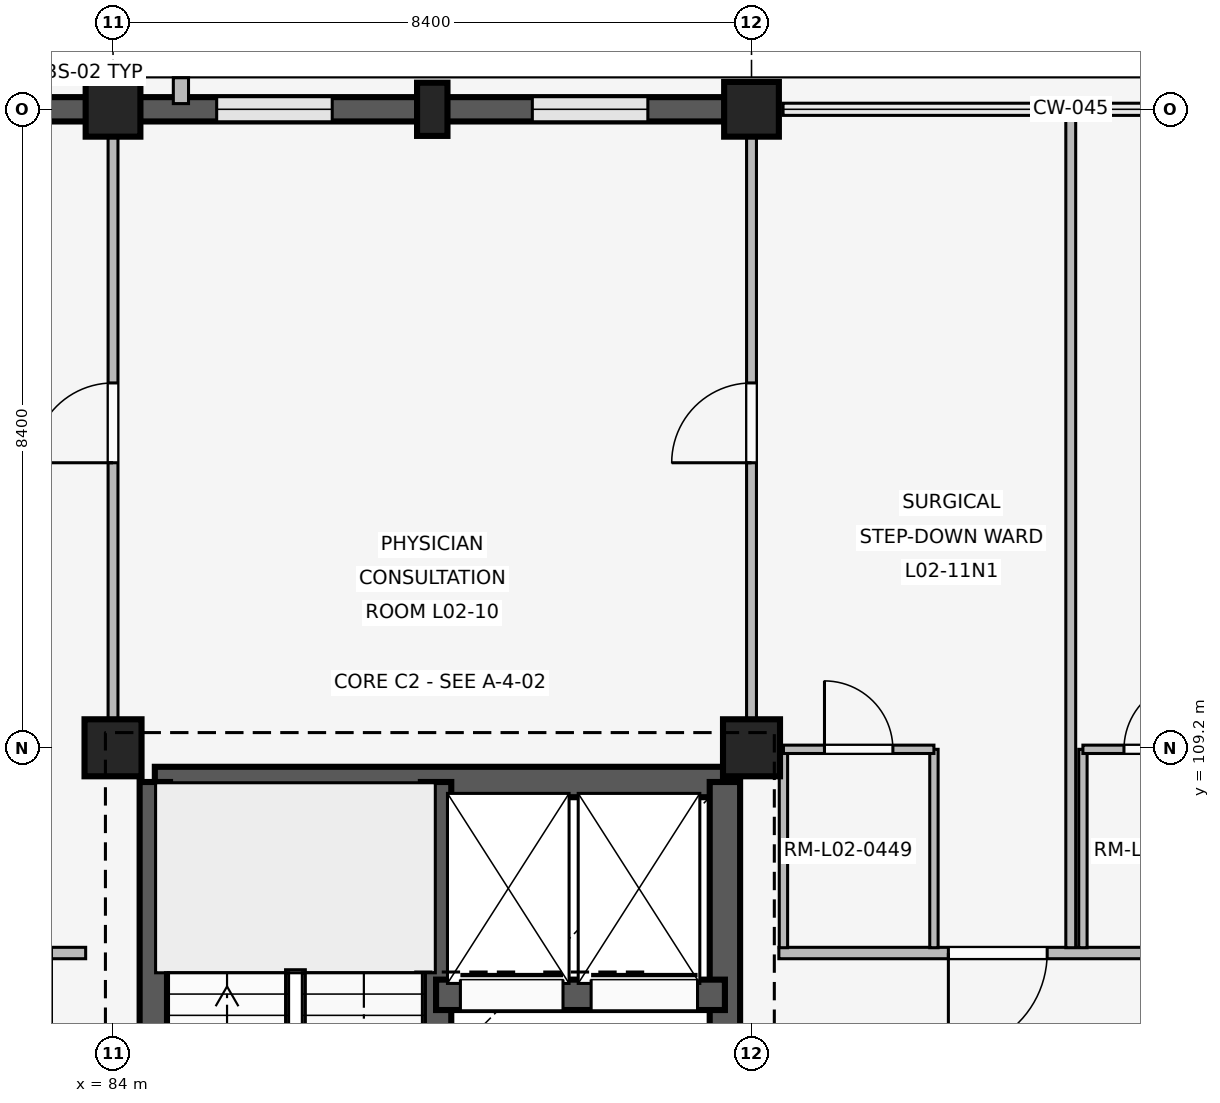
"""IFC4 building model, lengths in metres.
Left out: names, types, materials, properties, quantities, classifications, styles, units other than length and angle.
Written with IfcOpenShell. Run it as: python <this file> out.ifc"""

import sys

from ifc_helpers import new_model, si_unit, direction, frame, frame_2d, origin, origin_2d, place, context, subcontext, project, spatial, rectangle, extrude, element, fill, save


model = new_model("IFC4")
c1 = context("Model", 3, precision=1e-05, world=origin(), true_north=direction((0.0, 1.0)))
c2 = subcontext(c1, "Body", "Model", "MODEL_VIEW")
j1 = project(units=[si_unit("LENGTHUNIT", "METRE"), si_unit("PLANEANGLEUNIT", "RADIAN")], contexts=[c1])
p1 = place(None, origin())
s1 = spatial("IfcSite", under=j1, at=p1, CompositionType="ELEMENT")
p2 = place(p1, origin())
s2 = spatial("IfcBuilding", under=s1, at=p2, CompositionType="ELEMENT")
p3 = place(p2, frame((0.0, 0.0, 8.1)))
s3 = spatial("IfcBuildingStorey", under=s2, at=p3, CompositionType="ELEMENT", Elevation=8.1)
p4 = place(p3, frame((84.0, 109.2, 0.0), z_axis=(0.0, 0.0, 1.0), x_axis=(1.0, 0.0, 0.0)))
e1 = element("IfcColumn", 1, at=p4, inside=s3, PredefinedType="COLUMN", context=c2, shape_type="SweptSolid", body=[
    extrude(rectangle(XDim=0.75, YDim=0.75, at=origin_2d()), origin(), (0.0, 0.0, 1.0), 4.8),
])
p5 = place(p3, frame((84.0, 117.6, 0.0), z_axis=(0.0, 0.0, 1.0), x_axis=(1.0, 0.0, 0.0)))
e2 = element("IfcColumn", 2, at=p5, inside=s3, PredefinedType="COLUMN", context=c2, shape_type="SweptSolid", body=[
    extrude(rectangle(XDim=0.72, YDim=0.72, at=origin_2d()), origin(), (0.0, 0.0, 1.0), 4.8),
])
p6 = place(p3, frame((92.4, 109.2, 0.0), z_axis=(0.0, 0.0, 1.0), x_axis=(1.0, 0.0, 0.0)))
e3 = element("IfcColumn", 3, at=p6, inside=s3, PredefinedType="COLUMN", context=c2, shape_type="SweptSolid", body=[
    extrude(rectangle(XDim=0.75, YDim=0.75, at=origin_2d()), origin(), (0.0, 0.0, 1.0), 4.8),
])
p7 = place(p3, frame((92.4, 117.6, 0.0), z_axis=(0.0, 0.0, 1.0), x_axis=(1.0, 0.0, 0.0)))
e4 = element("IfcColumn", 4, at=p7, inside=s3, PredefinedType="COLUMN", context=c2, shape_type="SweptSolid", body=[
    extrude(rectangle(XDim=0.72, YDim=0.72, at=origin_2d()), origin(), (0.0, 0.0, 1.0), 4.8),
])
p8 = place(p3, frame((88.2, 117.6, 0.0), z_axis=(0.0, 0.0, 1.0), x_axis=(1.0, 0.0, 0.0)))
e5 = element("IfcColumn", 5, at=p8, inside=s3, PredefinedType="PILASTER", context=c2, shape_type="SweptSolid", body=[
    extrude(rectangle(XDim=0.4, YDim=0.7, at=origin_2d()), origin(), (0.0, 0.0, 1.0), 4.8),
])
p9 = place(p3, frame((75.955, 117.6, 0.0), z_axis=(0.0, 0.0, 1.0), x_axis=(1.0, 0.0, 0.0)))
e6 = element("IfcWall", 6, at=p9, inside=s3, PredefinedType="SOLIDWALL", context=c2, shape_type="SweptSolid", body=[
    extrude(rectangle(XDim=7.69, YDim=0.32, at=frame_2d((3.845, 0.0))), origin(), (0.0, 0.0, 1.0), 3.86),
])
p10 = place(p9, frame((0.969, 0.0, 0.85)))
e7 = element("IfcOpeningElement", 7, at=p10, cuts=e6, PredefinedType="OPENING", context=c2, shape_type="SweptSolid", body=[
    extrude(rectangle(XDim=1.6, YDim=1.65, at=frame_2d((0.8, 0.825))), frame((0.0, 0.17, 0.0), z_axis=(0.0, -1.0, 0.0), x_axis=(1.0, 0.0, 0.0)), (0.0, 0.0, 1.0), 0.34),
])
p11 = place(p9, frame((5.121, 0.0, 0.85)))
e8 = element("IfcOpeningElement", 8, at=p11, cuts=e6, PredefinedType="OPENING", context=c2, shape_type="SweptSolid", body=[
    extrude(rectangle(XDim=1.6, YDim=1.65, at=frame_2d((0.8, 0.825))), frame((0.0, 0.17, 0.0), z_axis=(0.0, -1.0, 0.0), x_axis=(1.0, 0.0, 0.0)), (0.0, 0.0, 1.0), 0.34),
])
p12 = place(p3, frame((84.355, 117.6, 0.0), z_axis=(0.0, 0.0, 1.0), x_axis=(1.0, 0.0, 0.0)))
e9 = element("IfcWall", 9, at=p12, inside=s3, PredefinedType="SOLIDWALL", context=c2, shape_type="SweptSolid", body=[
    extrude(rectangle(XDim=7.69, YDim=0.32, at=frame_2d((3.845, 0.0))), origin(), (0.0, 0.0, 1.0), 3.86),
])
p13 = place(p12, frame((1.009, 0.0, 0.85)))
e10 = element("IfcOpeningElement", 10, at=p13, cuts=e9, PredefinedType="OPENING", context=c2, shape_type="SweptSolid", body=[
    extrude(rectangle(XDim=1.52, YDim=1.65, at=frame_2d((0.76, 0.825))), frame((0.0, 0.17, 0.0), z_axis=(0.0, -1.0, 0.0), x_axis=(1.0, 0.0, 0.0)), (0.0, 0.0, 1.0), 0.34),
])
p14 = place(p12, frame((5.161, 0.0, 0.85)))
e11 = element("IfcOpeningElement", 11, at=p14, cuts=e9, PredefinedType="OPENING", context=c2, shape_type="SweptSolid", body=[
    extrude(rectangle(XDim=1.52, YDim=1.65, at=frame_2d((0.76, 0.825))), frame((0.0, 0.17, 0.0), z_axis=(0.0, -1.0, 0.0), x_axis=(1.0, 0.0, 0.0)), (0.0, 0.0, 1.0), 0.34),
])
p15 = place(p3, frame((84.893, 117.675, 0.0), z_axis=(0.0, 0.0, 1.0), x_axis=(0.0, 1.0, 0.0)))
e12 = element("IfcWall", 12, at=p15, inside=s3, PredefinedType="ELEMENTEDWALL", context=c2, shape_type="SweptSolid", body=[
    extrude(rectangle(XDim=0.34, YDim=0.2, at=frame_2d((0.17, 0.0))), origin(), (0.0, 0.0, 1.0), 3.84),
])
p16 = place(p3, frame((84.55, 108.75, 0.0), z_axis=(0.0, 0.0, 1.0), x_axis=(1.0, 0.0, 0.0)))
e13 = element("IfcWall", 13, at=p16, inside=s3, PredefinedType="SHEAR", context=c2, shape_type="SweptSolid", body=[
    extrude(rectangle(XDim=7.5, YDim=0.4, at=frame_2d((3.75, 0.0))), origin(), (0.0, 0.0, 1.0), 4.52),
])
p17 = place(p3, frame((84.55, 101.2, 0.0), z_axis=(0.0, 0.0, 1.0), x_axis=(0.0, 1.0, 0.0)))
e14 = element("IfcWall", 14, at=p17, inside=s3, PredefinedType="SHEAR", context=c2, shape_type="SweptSolid", body=[
    extrude(rectangle(XDim=7.55, YDim=0.4, at=frame_2d((3.775, 0.0))), origin(), (0.0, 0.0, 1.0), 4.52),
])
p18 = place(p17, frame((0.28, 0.0, 0.0)))
e15 = element("IfcOpeningElement", 15, at=p18, cuts=e14, PredefinedType="OPENING", context=c2, shape_type="SweptSolid", body=[
    extrude(rectangle(XDim=1.0, YDim=2.15, at=frame_2d((0.5, 1.075))), frame((0.0, 0.21, 0.0), z_axis=(0.0, -1.0, 0.0), x_axis=(1.0, 0.0, 0.0)), (0.0, 0.0, 1.0), 0.42),
])
p19 = place(p3, frame((92.05, 101.2, 0.0), z_axis=(0.0, 0.0, 1.0), x_axis=(0.0, 1.0, 0.0)))
e16 = element("IfcWall", 16, at=p19, inside=s3, PredefinedType="SHEAR", context=c2, shape_type="SweptSolid", body=[
    extrude(rectangle(XDim=7.55, YDim=0.4, at=frame_2d((3.775, 0.0))), origin(), (0.0, 0.0, 1.0), 4.52),
])
p20 = place(p19, frame((2.4, 0.0, 0.0)))
e17 = element("IfcOpeningElement", 17, at=p20, cuts=e16, PredefinedType="OPENING", context=c2, shape_type="SweptSolid", body=[
    extrude(rectangle(XDim=1.2, YDim=2.2, at=frame_2d((0.6, 1.1))), frame((0.0, 0.21, 0.0), z_axis=(0.0, -1.0, 0.0), x_axis=(1.0, 0.0, 0.0)), (0.0, 0.0, 1.0), 0.42),
])
p21 = place(p3, frame((88.25, 101.2, 0.0), z_axis=(0.0, 0.0, 1.0), x_axis=(0.0, 1.0, 0.0)))
e18 = element("IfcWall", 18, at=p21, inside=s3, PredefinedType="SHEAR", context=c2, shape_type="SweptSolid", body=[
    extrude(rectangle(XDim=7.55, YDim=0.4, at=frame_2d((3.775, 0.0))), origin(), (0.0, 0.0, 1.0), 4.52),
])
p22 = place(p21, frame((0.28, 0.0, 0.0)))
e19 = element("IfcOpeningElement", 19, at=p22, cuts=e18, PredefinedType="OPENING", context=c2, shape_type="SweptSolid", body=[
    extrude(rectangle(XDim=1.0, YDim=2.15, at=frame_2d((0.5, 1.075))), frame((0.0, 0.21, 0.0), z_axis=(0.0, -1.0, 0.0), x_axis=(1.0, 0.0, 0.0)), (0.0, 0.0, 1.0), 0.42),
])
p23 = place(p3, frame((88.25, 105.95, 0.0), z_axis=(0.0, 0.0, 1.0), x_axis=(1.0, 0.0, 0.0)))
e20 = element("IfcWall", 20, at=p23, inside=s3, PredefinedType="SHEAR", context=c2, shape_type="SweptSolid", body=[
    extrude(rectangle(XDim=3.8, YDim=0.4, at=frame_2d((1.9, 0.0))), origin(), (0.0, 0.0, 1.0), 4.52),
])
p24 = place(p23, frame((0.32, 0.0, 0.0)))
e21 = element("IfcOpeningElement", 21, at=p24, cuts=e20, PredefinedType="OPENING", context=c2, shape_type="SweptSolid", body=[
    extrude(rectangle(XDim=1.35, YDim=2.25, at=frame_2d((0.675, 1.125))), frame((0.0, 0.21, 0.0), z_axis=(0.0, -1.0, 0.0), x_axis=(1.0, 0.0, 0.0)), (0.0, 0.0, 1.0), 0.42),
])
p25 = place(p23, frame((2.04, 0.0, 0.0)))
e22 = element("IfcOpeningElement", 22, at=p25, cuts=e20, PredefinedType="OPENING", context=c2, shape_type="SweptSolid", body=[
    extrude(rectangle(XDim=1.4, YDim=2.25, at=frame_2d((0.7, 1.125))), frame((0.0, 0.21, 0.0), z_axis=(0.0, -1.0, 0.0), x_axis=(1.0, 0.0, 0.0)), (0.0, 0.0, 1.0), 0.42),
])
p26 = place(p3, frame((83.64, 106.5, 0.0), z_axis=(0.0, 0.0, 1.0), x_axis=(-1.0, 0.0, 0.0)))
e23 = element("IfcWall", 23, at=p26, inside=s3, PredefinedType="PARTITIONING", context=c2, shape_type="SweptSolid", body=[
    extrude(rectangle(XDim=7.96, YDim=0.15, at=frame_2d((3.98, 0.0))), origin(), (0.0, 0.0, 1.0), 3.84),
])
p27 = place(p26, frame((0.45, 0.0, 0.0)))
e24 = element("IfcOpeningElement", 24, at=p27, cuts=e23, PredefinedType="OPENING", context=c2, shape_type="SweptSolid", body=[
    extrude(rectangle(XDim=1.3, YDim=2.25, at=frame_2d((0.65, 1.125))), frame((0.0, 0.085, 0.0), z_axis=(0.0, -1.0, 0.0), x_axis=(1.0, 0.0, 0.0)), (0.0, 0.0, 1.0), 0.17),
])
p28 = place(p26, frame((4.15, 0.0, 0.0)))
e25 = element("IfcOpeningElement", 25, at=p28, cuts=e23, PredefinedType="OPENING", context=c2, shape_type="SweptSolid", body=[
    extrude(rectangle(XDim=1.3, YDim=2.25, at=frame_2d((0.65, 1.125))), frame((0.0, 0.085, 0.0), z_axis=(0.0, -1.0, 0.0), x_axis=(1.0, 0.0, 0.0)), (0.0, 0.0, 1.0), 0.17),
])
p29 = place(p3, frame((84.0, 109.55, 0.0), z_axis=(0.0, 0.0, 1.0), x_axis=(0.0, 1.0, 0.0)))
e26 = element("IfcWall", 26, at=p29, inside=s3, PredefinedType="PARTITIONING", context=c2, shape_type="SweptSolid", body=[
    extrude(rectangle(XDim=7.91, YDim=0.13, at=frame_2d((3.955, 0.0))), origin(), (0.0, 0.0, 1.0), 3.84),
])
p30 = place(p29, frame((3.4, 0.0, 0.0)))
e27 = element("IfcOpeningElement", 27, at=p30, cuts=e26, PredefinedType="OPENING", context=c2, shape_type="SweptSolid", body=[
    extrude(rectangle(XDim=1.05, YDim=2.2, at=frame_2d((0.525, 1.1))), frame((0.0, 0.075, 0.0), z_axis=(0.0, -1.0, 0.0), x_axis=(1.0, 0.0, 0.0)), (0.0, 0.0, 1.0), 0.15),
])
p31 = place(p3, frame((92.4, 109.55, 0.0), z_axis=(0.0, 0.0, 1.0), x_axis=(0.0, 1.0, 0.0)))
e28 = element("IfcWall", 28, at=p31, inside=s3, PredefinedType="PARTITIONING", context=c2, shape_type="SweptSolid", body=[
    extrude(rectangle(XDim=7.91, YDim=0.13, at=frame_2d((3.955, 0.0))), origin(), (0.0, 0.0, 1.0), 3.84),
])
p32 = place(p31, frame((3.4, 0.0, 0.0)))
e29 = element("IfcOpeningElement", 29, at=p32, cuts=e28, PredefinedType="OPENING", context=c2, shape_type="SweptSolid", body=[
    extrude(rectangle(XDim=1.05, YDim=2.2, at=frame_2d((0.525, 1.1))), frame((0.0, 0.075, 0.0), z_axis=(0.0, -1.0, 0.0), x_axis=(1.0, 0.0, 0.0)), (0.0, 0.0, 1.0), 0.15),
])
p33 = place(p3, frame((100.72, 106.5, 0.0), z_axis=(0.0, 0.0, 1.0), x_axis=(-1.0, 0.0, 0.0)))
e30 = element("IfcWall", 30, at=p33, inside=s3, PredefinedType="PARTITIONING", context=c2, shape_type="SweptSolid", body=[
    extrude(rectangle(XDim=7.96, YDim=0.15, at=frame_2d((3.98, 0.0))), origin(), (0.0, 0.0, 1.0), 3.84),
])
p34 = place(p33, frame((0.73, 0.0, 0.0)))
e31 = element("IfcOpeningElement", 31, at=p34, cuts=e30, PredefinedType="OPENING", context=c2, shape_type="SweptSolid", body=[
    extrude(rectangle(XDim=1.3, YDim=2.25, at=frame_2d((0.65, 1.125))), frame((0.0, 0.085, 0.0), z_axis=(0.0, -1.0, 0.0), x_axis=(1.0, 0.0, 0.0)), (0.0, 0.0, 1.0), 0.17),
])
p35 = place(p33, frame((4.43, 0.0, 0.0)))
e32 = element("IfcOpeningElement", 32, at=p35, cuts=e30, PredefinedType="OPENING", context=c2, shape_type="SweptSolid", body=[
    extrude(rectangle(XDim=1.3, YDim=2.25, at=frame_2d((0.65, 1.125))), frame((0.0, 0.085, 0.0), z_axis=(0.0, -1.0, 0.0), x_axis=(1.0, 0.0, 0.0)), (0.0, 0.0, 1.0), 0.17),
])
p36 = place(p3, frame((96.6, 106.57, 0.0), z_axis=(0.0, 0.0, 1.0), x_axis=(0.0, 1.0, 0.0)))
e33 = element("IfcWall", 33, at=p36, inside=s3, PredefinedType="PARTITIONING", context=c2, shape_type="SweptSolid", body=[
    extrude(rectangle(XDim=10.93, YDim=0.13, at=frame_2d((5.465, 0.0))), origin(), (0.0, 0.0, 1.0), 3.84),
])
for number, where, z_axis, x_axis in (
    (34, (92.82, 106.57, 0.0), (0.0, 0.0, 1.0), (0.0, 1.0, 0.0)),
    (35, (94.8, 106.57, 0.0), (0.0, 0.0, 1.0), (0.0, 1.0, 0.0)),
):
    element("IfcWall", number, at=place(p3, frame(where, z_axis=z_axis, x_axis=x_axis)), inside=s3, PredefinedType="PARTITIONING", context=c2, shape_type="SweptSolid", body=[
        extrude(rectangle(XDim=2.61, YDim=0.11, at=frame_2d((1.305, 0.0))), origin(), (0.0, 0.0, 1.0), 3.84),
    ])
p37 = place(p3, frame((92.82, 109.18, 0.0), z_axis=(0.0, 0.0, 1.0), x_axis=(1.0, 0.0, 0.0)))
e36 = element("IfcWall", 36, at=p37, inside=s3, PredefinedType="PARTITIONING", context=c2, shape_type="SweptSolid", body=[
    extrude(rectangle(XDim=1.98, YDim=0.11, at=frame_2d((0.99, 0.0))), origin(), (0.0, 0.0, 1.0), 3.84),
])
p38 = place(p37, frame((0.54, 0.0, 0.0)))
e37 = element("IfcOpeningElement", 37, at=p38, cuts=e36, PredefinedType="OPENING", context=c2, shape_type="SweptSolid", body=[
    extrude(rectangle(XDim=0.9, YDim=2.1, at=frame_2d((0.45, 1.05))), frame((0.0, 0.065, 0.0), z_axis=(0.0, -1.0, 0.0), x_axis=(1.0, 0.0, 0.0)), (0.0, 0.0, 1.0), 0.13),
])
p39 = place(p3, frame((96.76, 106.57, 0.0), z_axis=(0.0, 0.0, 1.0), x_axis=(0.0, 1.0, 0.0)))
e38 = element("IfcWall", 38, at=p39, inside=s3, PredefinedType="PARTITIONING", context=c2, shape_type="SweptSolid", body=[
    extrude(rectangle(XDim=2.61, YDim=0.11, at=frame_2d((1.305, 0.0))), origin(), (0.0, 0.0, 1.0), 3.84),
])
p40 = place(p3, frame((96.76, 109.18, 0.0), z_axis=(0.0, 0.0, 1.0), x_axis=(1.0, 0.0, 0.0)))
e39 = element("IfcWall", 39, at=p40, inside=s3, PredefinedType="PARTITIONING", context=c2, shape_type="SweptSolid", body=[
    extrude(rectangle(XDim=1.98, YDim=0.11, at=frame_2d((0.99, 0.0))), origin(), (0.0, 0.0, 1.0), 3.84),
])
p41 = place(p40, frame((0.54, 0.0, 0.0)))
e40 = element("IfcOpeningElement", 40, at=p41, cuts=e39, PredefinedType="OPENING", context=c2, shape_type="SweptSolid", body=[
    extrude(rectangle(XDim=0.9, YDim=2.1, at=frame_2d((0.45, 1.05))), frame((0.0, 0.065, 0.0), z_axis=(0.0, -1.0, 0.0), x_axis=(1.0, 0.0, 0.0)), (0.0, 0.0, 1.0), 0.13),
])
p42 = place(p13, origin())
e41 = element("IfcWindow", 41, at=p42, inside=s3, PartitioningType="SINGLE_PANEL", PredefinedType="WINDOW", context=c2, shape_type="SweptSolid", body=[
    extrude(rectangle(XDim=1.52, YDim=1.65, at=frame_2d((0.76, 0.825))), frame((0.0, 0.03, 0.0), z_axis=(0.0, -1.0, 0.0), x_axis=(1.0, 0.0, 0.0)), (0.0, 0.0, 1.0), 0.06),
])
fill(e10, e41)
p43 = place(p14, origin())
e42 = element("IfcWindow", 42, at=p43, inside=s3, PartitioningType="SINGLE_PANEL", PredefinedType="WINDOW", context=c2, shape_type="SweptSolid", body=[
    extrude(rectangle(XDim=1.52, YDim=1.65, at=frame_2d((0.76, 0.825))), frame((0.0, 0.03, 0.0), z_axis=(0.0, -1.0, 0.0), x_axis=(1.0, 0.0, 0.0)), (0.0, 0.0, 1.0), 0.06),
])
fill(e11, e42)
p44 = place(p24, origin())
e43 = element("IfcDoor", 43, at=p44, inside=s3, OperationType="SLIDING_TO_LEFT", PredefinedType="DOOR", context=c2, shape_type="SweptSolid", body=[
    extrude(rectangle(XDim=1.35, YDim=2.25, at=frame_2d((0.675, 1.125))), frame((0.0, 0.025, 0.0), z_axis=(0.0, -1.0, 0.0), x_axis=(1.0, 0.0, 0.0)), (0.0, 0.0, 1.0), 0.05),
])
fill(e21, e43)
p45 = place(p25, origin())
e44 = element("IfcDoor", 44, at=p45, inside=s3, OperationType="SLIDING_TO_LEFT", PredefinedType="DOOR", context=c2, shape_type="SweptSolid", body=[
    extrude(rectangle(XDim=1.4, YDim=2.25, at=frame_2d((0.7, 1.125))), frame((0.0, 0.025, 0.0), z_axis=(0.0, -1.0, 0.0), x_axis=(1.0, 0.0, 0.0)), (0.0, 0.0, 1.0), 0.05),
])
fill(e22, e44)
p46 = place(p30, origin())
e45 = element("IfcDoor", 45, at=p46, inside=s3, OperationType="SINGLE_SWING_LEFT", PredefinedType="DOOR", context=c2, shape_type="SweptSolid", body=[
    extrude(rectangle(XDim=1.05, YDim=2.2, at=frame_2d((0.525, 1.1))), frame((0.0, 0.025, 0.0), z_axis=(0.0, -1.0, 0.0), x_axis=(1.0, 0.0, 0.0)), (0.0, 0.0, 1.0), 0.05),
])
fill(e27, e45)
p47 = place(p32, origin())
e46 = element("IfcDoor", 46, at=p47, inside=s3, OperationType="SINGLE_SWING_LEFT", PredefinedType="DOOR", context=c2, shape_type="SweptSolid", body=[
    extrude(rectangle(XDim=1.05, YDim=2.2, at=frame_2d((0.525, 1.1))), frame((0.0, 0.025, 0.0), z_axis=(0.0, -1.0, 0.0), x_axis=(1.0, 0.0, 0.0)), (0.0, 0.0, 1.0), 0.05),
])
fill(e29, e46)
p48 = place(p35, origin())
e47 = element("IfcDoor", 47, at=p48, inside=s3, OperationType="SINGLE_SWING_RIGHT", PredefinedType="DOOR", context=c2, shape_type="SweptSolid", body=[
    extrude(rectangle(XDim=1.3, YDim=2.25, at=frame_2d((0.65, 1.125))), frame((0.0, 0.025, 0.0), z_axis=(0.0, -1.0, 0.0), x_axis=(1.0, 0.0, 0.0)), (0.0, 0.0, 1.0), 0.05),
])
fill(e32, e47)
p49 = place(p38, origin())
e48 = element("IfcDoor", 48, at=p49, inside=s3, OperationType="SINGLE_SWING_LEFT", PredefinedType="DOOR", context=c2, shape_type="SweptSolid", body=[
    extrude(rectangle(XDim=0.9, YDim=2.1, at=frame_2d((0.45, 1.05))), frame((0.0, 0.025, 0.0), z_axis=(0.0, -1.0, 0.0), x_axis=(1.0, 0.0, 0.0)), (0.0, 0.0, 1.0), 0.05),
])
fill(e37, e48)
p50 = place(p41, origin())
e49 = element("IfcDoor", 49, at=p50, inside=s3, OperationType="SINGLE_SWING_RIGHT", PredefinedType="DOOR", context=c2, shape_type="SweptSolid", body=[
    extrude(rectangle(XDim=0.9, YDim=2.1, at=frame_2d((0.45, 1.05))), frame((0.0, 0.025, 0.0), z_axis=(0.0, -1.0, 0.0), x_axis=(1.0, 0.0, 0.0)), (0.0, 0.0, 1.0), 0.05),
])
fill(e40, e49)
save(model, sys.argv[1])
